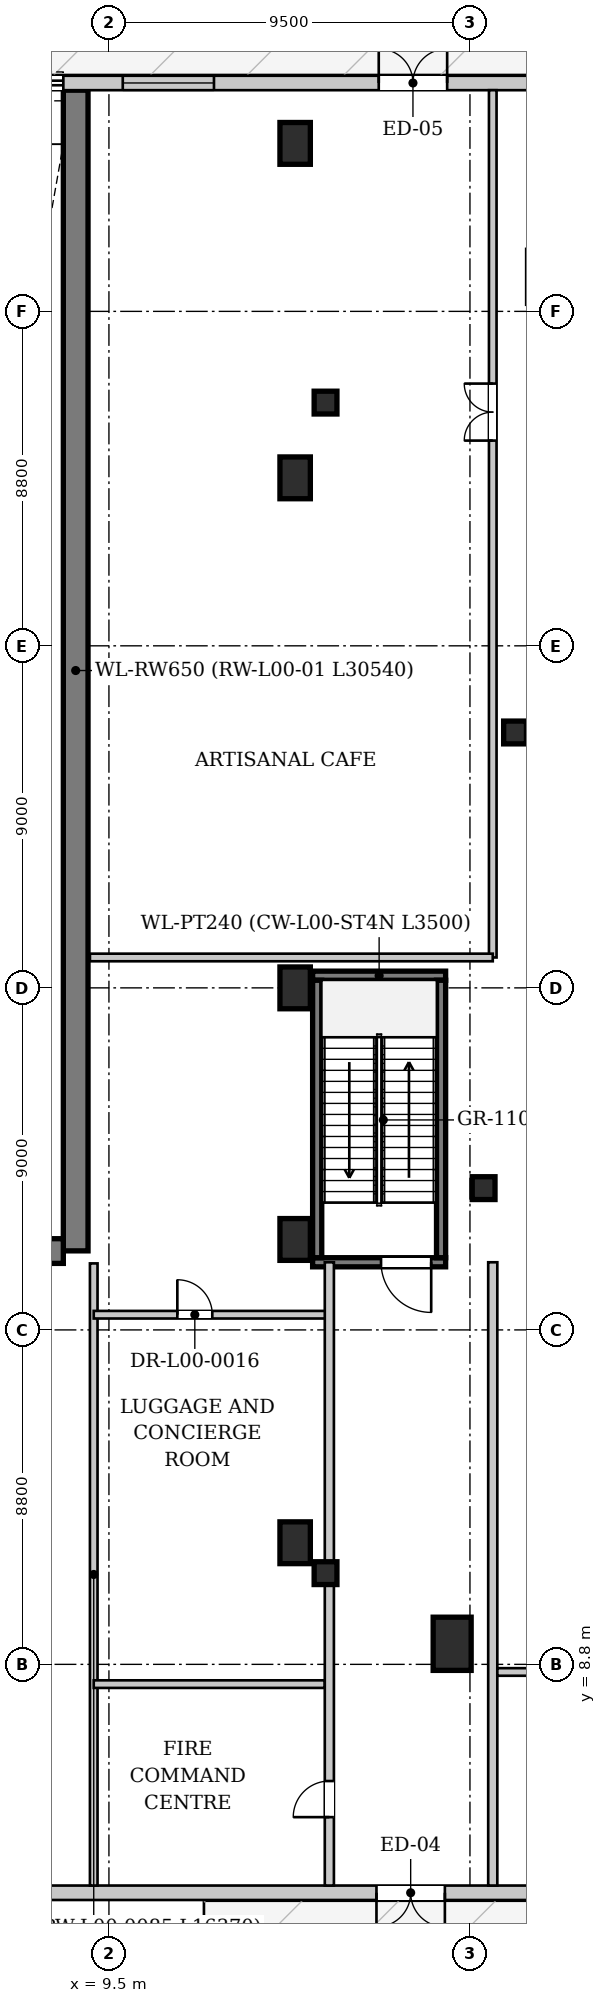
"""IFC4 building model, lengths in metres.
Left out: names, types, materials, properties, quantities, classifications, styles, units other than length and angle.
Written with IfcOpenShell. Run it as: python <this file> out.ifc"""

import sys

from ifc_helpers import new_model, si_unit, direction, frame, frame_2d, origin, origin_2d, place, context, subcontext, project, spatial, rectangle, hollow_rectangle, extrude, source, transform, mapped, element, fill, save


model = new_model("IFC4")
c1 = context("Model", 3, precision=1e-05, world=origin(), true_north=direction((0.0, 1.0)))
c2 = subcontext(c1, "Body", "Model", "MODEL_VIEW")
j1 = project(units=[si_unit("LENGTHUNIT", "METRE"), si_unit("PLANEANGLEUNIT", "RADIAN")], contexts=[c1])
p1 = place(None, origin())
s1 = spatial("IfcSite", under=j1, at=p1, CompositionType="ELEMENT")
p2 = place(p1, origin())
s2 = spatial("IfcBuilding", under=s1, at=p2, CompositionType="ELEMENT")
p3 = place(p2, origin())
s3 = spatial("IfcBuildingStorey", under=s2, at=p3, CompositionType="ELEMENT", Elevation=0.0)
p4 = place(p3, frame((8.625, 19.68, 0.0), z_axis=(0.0, 0.0, 1.0), x_axis=(0.0, 1.0, 0.0)))
e1 = element("IfcWall", 1, at=p4, inside=s3, PredefinedType="SOLIDWALL", context=c2, shape_type="SweptSolid", body=[
    extrude(rectangle(XDim=30.54, YDim=0.65, at=frame_2d((15.27, 0.0))), origin(), (0.0, 0.0, 1.0), 5.08),
])
p5 = place(p3, frame((2.38, 19.675, 0.0), z_axis=(0.0, 0.0, 1.0), x_axis=(1.0, 0.0, 0.0)))
e2 = element("IfcWall", 2, at=p5, inside=s3, PredefinedType="SOLIDWALL", context=c2, shape_type="SweptSolid", body=[
    extrude(rectangle(XDim=5.92, YDim=0.65, at=frame_2d((2.96, 0.0))), origin(), (0.0, 0.0, 1.0), 5.08),
])
m1 = source(origin(), c2, "Body", "SweptSolid", [
    extrude(rectangle(XDim=1.0, YDim=1.4, at=origin_2d()), origin(), (0.0, 0.0, 1.0), 5.235),
])
p6 = place(p3, frame((18.532, 9.341, 0.0), z_axis=(0.0, 0.0, 1.0), x_axis=(1.0, 0.0, 0.0)))
e3 = element("IfcColumn", 3, at=p6, inside=s3, PredefinedType="COLUMN", context=c2, shape_type="MappedRepresentation", body=[
    mapped(m1, transform((0.0, 0.0, 0.0), x_axis=(1.0, 0.0, 0.0), y_axis=(0.0, 1.0, 0.0), z_axis=(0.0, 0.0, 1.0), scale=1.0)),
])
m2 = source(origin(), c2, "Body", "SweptSolid", [
    extrude(hollow_rectangle(XDim=0.6, YDim=0.6, WallThickness=0.035, at=origin_2d()), origin(), (0.0, 0.0, 1.0), 5.235),
])
for number, where, z_axis, x_axis in (
    (4, (15.2, 11.2, 0.0), (0.0, 0.0, 1.0), (1.0, 0.0, 0.0)),
    (5, (15.2, 42.0, 0.0), (0.0, 0.0, 1.0), (1.0, 0.0, 0.0)),
):
    element("IfcColumn", number, at=place(p3, frame(where, z_axis=z_axis, x_axis=x_axis)), inside=s3, PredefinedType="COLUMN", context=c2, shape_type="MappedRepresentation", body=[
        mapped(m2, transform((0.0, 0.0, 0.0), x_axis=(1.0, 0.0, 0.0), y_axis=(0.0, 1.0, 0.0), z_axis=(0.0, 0.0, 1.0), scale=1.0)),
    ])
m3 = source(origin(), c2, "Body", "SweptSolid", [
    extrude(rectangle(XDim=0.8, YDim=1.1, at=origin_2d()), origin(), (0.0, 0.0, 1.0), 5.235),
])
for number, where, z_axis, x_axis in (
    (6, (14.4, 12.0, 0.0), (0.0, 0.0, 1.0), (1.0, 0.0, 0.0)),
    (7, (14.4, 19.98, 0.0), (0.0, 0.0, 1.0), (1.0, 0.0, 0.0)),
    (8, (14.4, 26.6, 0.0), (0.0, 0.0, 1.0), (1.0, 0.0, 0.0)),
    (9, (14.4, 40.02, 0.0), (0.0, 0.0, 1.0), (1.0, 0.0, 0.0)),
    (10, (14.4, 48.82, 0.0), (0.0, 0.0, 1.0), (1.0, 0.0, 0.0)),
):
    element("IfcColumn", number, at=place(p3, frame(where, z_axis=z_axis, x_axis=x_axis)), inside=s3, PredefinedType="COLUMN", context=c2, shape_type="MappedRepresentation", body=[
        mapped(m3, transform((0.0, 0.0, 0.0), x_axis=(1.0, 0.0, 0.0), y_axis=(0.0, 1.0, 0.0), z_axis=(0.0, 0.0, 1.0), scale=1.0)),
    ])
for number, where, z_axis, x_axis in (
    (11, (20.187, 33.32, 0.0), (0.0, 0.0, 1.0), (1.0, 0.0, 0.0)),
    (12, (19.359, 21.331, 0.0), (0.0, 0.0, 1.0), (1.0, 0.0, 0.0)),
):
    element("IfcColumn", number, at=place(p3, frame(where, z_axis=z_axis, x_axis=x_axis)), inside=s3, PredefinedType="COLUMN", context=c2, shape_type="MappedRepresentation", body=[
        mapped(m2, transform((0.0, 0.0, 0.0), x_axis=(1.0, 0.0, 0.0), y_axis=(0.0, 1.0, 0.0), z_axis=(0.0, 0.0, 1.0), scale=1.0)),
    ])
p7 = place(p3, frame((34.8, 2.79, 0.0), z_axis=(0.0, 0.0, 1.0), x_axis=(-1.0, 0.0, 0.0)))
e13 = element("IfcWall", 13, at=p7, inside=s3, PredefinedType="SOLIDWALL", context=c2, shape_type="SweptSolid", body=[
    extrude(rectangle(XDim=32.8, YDim=0.38, at=frame_2d((16.4, 0.0))), origin(), (0.0, 0.0, 1.0), 4.522),
])
p8 = place(p7, frame((7.3, 0.0, 0.0)))
e14 = element("IfcOpeningElement", 14, at=p8, cuts=e13, PredefinedType="OPENING", context=c2, shape_type="SweptSolid", body=[
    extrude(rectangle(XDim=1.8, YDim=2.4, at=frame_2d((0.9, 1.2))), frame((0.0, 0.2, 0.0), z_axis=(0.0, -1.0, 0.0), x_axis=(1.0, 0.0, 0.0)), (0.0, 0.0, 1.0), 0.4),
])
p9 = place(p7, frame((16.46, 0.0, 0.0)))
e15 = element("IfcOpeningElement", 15, at=p9, cuts=e13, PredefinedType="OPENING", context=c2, shape_type="SweptSolid", body=[
    extrude(rectangle(XDim=1.8, YDim=2.4, at=frame_2d((0.9, 1.2))), frame((0.0, 0.2, 0.0), z_axis=(0.0, -1.0, 0.0), x_axis=(1.0, 0.0, 0.0)), (0.0, 0.0, 1.0), 0.4),
])
p10 = place(p7, frame((3.016, 0.0, 0.85)))
e16 = element("IfcOpeningElement", 16, at=p10, cuts=e13, PredefinedType="OPENING", context=c2, shape_type="SweptSolid", body=[
    extrude(rectangle(XDim=2.4, YDim=3.0, at=frame_2d((1.2, 1.5))), frame((0.0, 0.2, 0.0), z_axis=(0.0, -1.0, 0.0), x_axis=(1.0, 0.0, 0.0)), (0.0, 0.0, 1.0), 0.4),
])
p11 = place(p3, frame((2.0, 50.41, 0.0), z_axis=(0.0, 0.0, 1.0), x_axis=(1.0, 0.0, 0.0)))
e17 = element("IfcWall", 17, at=p11, inside=s3, PredefinedType="SOLIDWALL", context=c2, shape_type="SweptSolid", body=[
    extrude(rectangle(XDim=36.2, YDim=0.38, at=frame_2d((18.1, 0.0))), origin(), (0.0, 0.0, 1.0), 4.522),
])
p12 = place(p11, frame((1.2, 0.0, 0.0)))
e18 = element("IfcOpeningElement", 18, at=p12, cuts=e17, PredefinedType="OPENING", context=c2, shape_type="SweptSolid", body=[
    extrude(rectangle(XDim=5.1, YDim=4.2, at=frame_2d((2.55, 2.1))), frame((0.0, 0.2, 0.0), z_axis=(0.0, -1.0, 0.0), x_axis=(1.0, 0.0, 0.0)), (0.0, 0.0, 1.0), 0.4),
])
p13 = place(p11, frame((14.6, 0.0, 0.0)))
e19 = element("IfcOpeningElement", 19, at=p13, cuts=e17, PredefinedType="OPENING", context=c2, shape_type="SweptSolid", body=[
    extrude(rectangle(XDim=1.8, YDim=2.4, at=frame_2d((0.9, 1.2))), frame((0.0, 0.2, 0.0), z_axis=(0.0, -1.0, 0.0), x_axis=(1.0, 0.0, 0.0)), (0.0, 0.0, 1.0), 0.4),
])
p14 = place(p11, frame((32.35, 0.0, 0.0)))
e20 = element("IfcOpeningElement", 20, at=p14, cuts=e17, PredefinedType="OPENING", context=c2, shape_type="SweptSolid", body=[
    extrude(rectangle(XDim=1.8, YDim=2.4, at=frame_2d((0.9, 1.2))), frame((0.0, 0.2, 0.0), z_axis=(0.0, -1.0, 0.0), x_axis=(1.0, 0.0, 0.0)), (0.0, 0.0, 1.0), 0.4),
])
p15 = place(p11, frame((7.864, 0.0, 0.85)))
e21 = element("IfcOpeningElement", 21, at=p15, cuts=e17, PredefinedType="OPENING", context=c2, shape_type="SweptSolid", body=[
    extrude(rectangle(XDim=2.4, YDim=3.0, at=frame_2d((1.2, 1.5))), frame((0.0, 0.2, 0.0), z_axis=(0.0, -1.0, 0.0), x_axis=(1.0, 0.0, 0.0)), (0.0, 0.0, 1.0), 0.4),
])
p16 = place(p3, frame((18.36, 19.38, 0.0), z_axis=(0.0, 0.0, 1.0), x_axis=(-1.0, 0.0, 0.0)))
e22 = element("IfcWall", 22, at=p16, inside=s3, PredefinedType="PARTITIONING", context=c2, shape_type="SweptSolid", body=[
    extrude(rectangle(XDim=3.5, YDim=0.24, at=frame_2d((1.75, 0.0))), origin(), (0.0, 0.0, 1.0), 5.08),
])
p17 = place(p16, frame((0.38, 0.0, 0.0)))
e23 = element("IfcOpeningElement", 23, at=p17, cuts=e22, PredefinedType="OPENING", context=c2, shape_type="SweptSolid", body=[
    extrude(rectangle(XDim=1.32, YDim=2.2, at=frame_2d((0.66, 1.1))), frame((0.0, 0.13, 0.0), z_axis=(0.0, -1.0, 0.0), x_axis=(1.0, 0.0, 0.0)), (0.0, 0.0, 1.0), 0.26),
])
p18 = place(p3, frame((14.86, 26.92, 0.0), z_axis=(0.0, 0.0, 1.0), x_axis=(1.0, 0.0, 0.0)))
e24 = element("IfcWall", 24, at=p18, inside=s3, PredefinedType="PARTITIONING", context=c2, shape_type="SweptSolid", body=[
    extrude(rectangle(XDim=3.5, YDim=0.24, at=frame_2d((1.75, 0.0))), origin(), (0.0, 0.0, 1.0), 5.08),
])
for number, where, z_axis, x_axis in (
    (25, (14.98, 19.5, 0.0), (0.0, 0.0, 1.0), (0.0, 1.0, 0.0)),
    (26, (18.24, 26.8, 0.0), (0.0, 0.0, 1.0), (0.0, -1.0, 0.0)),
):
    element("IfcWall", number, at=place(p3, frame(where, z_axis=z_axis, x_axis=x_axis)), inside=s3, PredefinedType="PARTITIONING", context=c2, shape_type="SweptSolid", body=[
        extrude(rectangle(XDim=7.3, YDim=0.24, at=frame_2d((3.65, 0.0))), origin(), (0.0, 0.0, 1.0), 5.08),
    ])
p19 = place(p3, frame((9.1, 2.98, 0.0), z_axis=(0.0, 0.0, 1.0), x_axis=(0.0, 1.0, 0.0)))
e27 = element("IfcWall", 27, at=p19, inside=s3, PredefinedType="PARTITIONING", context=c2, shape_type="SweptSolid", body=[
    extrude(rectangle(XDim=16.37, YDim=0.2, at=frame_2d((8.185, 0.0))), origin(), (0.0, 0.0, 1.0), 4.43),
])
p20 = place(p3, frame((9.1, 8.28, 0.0), z_axis=(0.0, 0.0, 1.0), x_axis=(1.0, 0.0, 0.0)))
e28 = element("IfcWall", 28, at=p20, inside=s3, PredefinedType="PARTITIONING", context=c2, shape_type="SweptSolid", body=[
    extrude(rectangle(XDim=6.08, YDim=0.2, at=frame_2d((3.04, 0.0))), origin(), (0.0, 0.0, 1.0), 4.43),
])
p21 = place(p3, frame((9.1, 18.0, 0.0), z_axis=(0.0, 0.0, 1.0), x_axis=(1.0, 0.0, 0.0)))
e29 = element("IfcWall", 29, at=p21, inside=s3, PredefinedType="PARTITIONING", context=c2, shape_type="SweptSolid", body=[
    extrude(rectangle(XDim=6.2, YDim=0.2, at=frame_2d((3.1, 0.0))), origin(), (0.0, 0.0, 1.0), 4.43),
])
p22 = place(p21, frame((2.2, 0.0, 0.0)))
e30 = element("IfcOpeningElement", 30, at=p22, cuts=e29, PredefinedType="OPENING", context=c2, shape_type="SweptSolid", body=[
    extrude(rectangle(XDim=0.92, YDim=2.1, at=frame_2d((0.46, 1.05))), frame((0.0, 0.11, 0.0), z_axis=(0.0, -1.0, 0.0), x_axis=(1.0, 0.0, 0.0)), (0.0, 0.0, 1.0), 0.22),
])
p23 = place(p3, frame((15.3, 2.98, 0.0), z_axis=(0.0, 0.0, 1.0), x_axis=(0.0, 1.0, 0.0)))
e31 = element("IfcWall", 31, at=p23, inside=s3, PredefinedType="PARTITIONING", context=c2, shape_type="SweptSolid", body=[
    extrude(rectangle(XDim=16.4, YDim=0.24, at=frame_2d((8.2, 0.0))), origin(), (0.0, 0.0, 1.0), 4.43),
])
p24 = place(p23, frame((1.8, 0.0, 0.0)))
e32 = element("IfcOpeningElement", 32, at=p24, cuts=e31, PredefinedType="OPENING", context=c2, shape_type="SweptSolid", body=[
    extrude(rectangle(XDim=0.95, YDim=2.1, at=frame_2d((0.475, 1.05))), frame((0.0, 0.13, 0.0), z_axis=(0.0, -1.0, 0.0), x_axis=(1.0, 0.0, 0.0)), (0.0, 0.0, 1.0), 0.26),
])
p25 = place(p3, frame((19.6, 2.98, 0.0), z_axis=(0.0, 0.0, 1.0), x_axis=(0.0, 1.0, 0.0)))
e33 = element("IfcWall", 33, at=p25, inside=s3, PredefinedType="PARTITIONING", context=c2, shape_type="SweptSolid", body=[
    extrude(rectangle(XDim=16.4, YDim=0.24, at=frame_2d((8.2, 0.0))), origin(), (0.0, 0.0, 1.0), 4.43),
])
p26 = place(p3, frame((19.6, 27.4, 0.0), z_axis=(0.0, 0.0, 1.0), x_axis=(0.0, 1.0, 0.0)))
e34 = element("IfcWall", 34, at=p26, inside=s3, PredefinedType="PARTITIONING", context=c2, shape_type="SweptSolid", body=[
    extrude(rectangle(XDim=22.82, YDim=0.2, at=frame_2d((11.41, 0.0))), origin(), (0.0, 0.0, 1.0), 4.43),
])
p27 = place(p26, frame((13.6, 0.0, 0.0)))
e35 = element("IfcOpeningElement", 35, at=p27, cuts=e34, PredefinedType="OPENING", context=c2, shape_type="SweptSolid", body=[
    extrude(rectangle(XDim=1.5, YDim=2.25, at=frame_2d((0.75, 1.125))), frame((0.0, 0.11, 0.0), z_axis=(0.0, -1.0, 0.0), x_axis=(1.0, 0.0, 0.0)), (0.0, 0.0, 1.0), 0.22),
])
p28 = place(p3, frame((9.0, 27.4, 0.0), z_axis=(0.0, 0.0, 1.0), x_axis=(1.0, 0.0, 0.0)))
e36 = element("IfcWall", 36, at=p28, inside=s3, PredefinedType="PARTITIONING", context=c2, shape_type="SweptSolid", body=[
    extrude(rectangle(XDim=10.6, YDim=0.2, at=frame_2d((5.3, 0.0))), origin(), (0.0, 0.0, 1.0), 4.43),
])
p29 = place(p3, frame((19.72, 8.6, 0.0), z_axis=(0.0, 0.0, 1.0), x_axis=(1.0, 0.0, 0.0)))
e37 = element("IfcWall", 37, at=p29, inside=s3, PredefinedType="PARTITIONING", context=c2, shape_type="SweptSolid", body=[
    extrude(rectangle(XDim=34.76, YDim=0.2, at=frame_2d((17.38, 0.0))), origin(), (0.0, 0.0, 1.0), 4.43),
])
m4 = source(origin(), c2, "Body", "SweptSolid", [
    extrude(rectangle(XDim=5.1, YDim=4.2, at=frame_2d((2.55, 2.1))), frame((0.0, 0.025, 0.0), z_axis=(0.0, -1.0, 0.0), x_axis=(1.0, 0.0, 0.0)), (0.0, 0.0, 1.0), 0.05),
])
p30 = place(p12, origin())
e38 = element("IfcDoor", 38, at=p30, inside=s3, OperationType="ROLLINGUP", PredefinedType="GATE", context=c2, shape_type="MappedRepresentation", body=[
    mapped(m4, transform((0.0, 0.0, 0.0), x_axis=(1.0, 0.0, 0.0), y_axis=(0.0, 1.0, 0.0), z_axis=(0.0, 0.0, 1.0), scale=1.0)),
])
fill(e18, e38)
m5 = source(origin(), c2, "Body", "SweptSolid", [
    extrude(rectangle(XDim=1.8, YDim=2.4, at=frame_2d((0.9, 1.2))), frame((0.0, 0.025, 0.0), z_axis=(0.0, -1.0, 0.0), x_axis=(1.0, 0.0, 0.0)), (0.0, 0.0, 1.0), 0.05),
])
p31 = place(p9, origin())
e39 = element("IfcDoor", 39, at=p31, inside=s3, OperationType="DOUBLE_DOOR_SINGLE_SWING", PredefinedType="DOOR", context=c2, shape_type="MappedRepresentation", body=[
    mapped(m5, transform((0.0, 0.0, 0.0), x_axis=(1.0, 0.0, 0.0), y_axis=(0.0, 1.0, 0.0), z_axis=(0.0, 0.0, 1.0), scale=1.0)),
])
fill(e15, e39)
p32 = place(p13, origin())
e40 = element("IfcDoor", 40, at=p32, inside=s3, OperationType="DOUBLE_DOOR_SINGLE_SWING", PredefinedType="DOOR", context=c2, shape_type="MappedRepresentation", body=[
    mapped(m5, transform((0.0, 0.0, 0.0), x_axis=(1.0, 0.0, 0.0), y_axis=(0.0, 1.0, 0.0), z_axis=(0.0, 0.0, 1.0), scale=1.0)),
])
fill(e19, e40)
m6 = source(origin(), c2, "Body", "SweptSolid", [
    extrude(rectangle(XDim=2.4, YDim=3.0, at=frame_2d((1.2, 1.5))), frame((0.0, 0.03, 0.0), z_axis=(0.0, -1.0, 0.0), x_axis=(1.0, 0.0, 0.0)), (0.0, 0.0, 1.0), 0.06),
])
p33 = place(p15, origin())
e41 = element("IfcWindow", 41, at=p33, inside=s3, PartitioningType="SINGLE_PANEL", PredefinedType="WINDOW", context=c2, shape_type="MappedRepresentation", body=[
    mapped(m6, transform((0.0, 0.0, 0.0), x_axis=(1.0, 0.0, 0.0), y_axis=(0.0, 1.0, 0.0), z_axis=(0.0, 0.0, 1.0), scale=1.0)),
])
fill(e21, e41)
m7 = source(origin(), c2, "Body", "SweptSolid", [
    extrude(rectangle(XDim=1.32, YDim=2.2, at=frame_2d((0.66, 1.1))), frame((0.0, 0.025, 0.0), z_axis=(0.0, -1.0, 0.0), x_axis=(1.0, 0.0, 0.0)), (0.0, 0.0, 1.0), 0.05),
])
p34 = place(p17, origin())
e42 = element("IfcDoor", 42, at=p34, inside=s3, OperationType="SINGLE_SWING_LEFT", PredefinedType="DOOR", context=c2, shape_type="MappedRepresentation", body=[
    mapped(m7, transform((0.0, 0.0, 0.0), x_axis=(1.0, 0.0, 0.0), y_axis=(0.0, 1.0, 0.0), z_axis=(0.0, 0.0, 1.0), scale=1.0)),
])
fill(e23, e42)
m8 = source(origin(), c2, "Body", "SweptSolid", [
    extrude(rectangle(XDim=0.92, YDim=2.1, at=frame_2d((0.46, 1.05))), frame((0.0, 0.025, 0.0), z_axis=(0.0, -1.0, 0.0), x_axis=(1.0, 0.0, 0.0)), (0.0, 0.0, 1.0), 0.05),
])
p35 = place(p22, origin())
e43 = element("IfcDoor", 43, at=p35, inside=s3, OperationType="SINGLE_SWING_LEFT", PredefinedType="DOOR", context=c2, shape_type="MappedRepresentation", body=[
    mapped(m8, transform((0.0, 0.0, 0.0), x_axis=(1.0, 0.0, 0.0), y_axis=(0.0, 1.0, 0.0), z_axis=(0.0, 0.0, 1.0), scale=1.0)),
])
fill(e30, e43)
m9 = source(origin(), c2, "Body", "SweptSolid", [
    extrude(rectangle(XDim=0.95, YDim=2.1, at=frame_2d((0.475, 1.05))), frame((0.0, 0.025, 0.0), z_axis=(0.0, -1.0, 0.0), x_axis=(1.0, 0.0, 0.0)), (0.0, 0.0, 1.0), 0.05),
])
p36 = place(p24, origin())
e44 = element("IfcDoor", 44, at=p36, inside=s3, OperationType="SINGLE_SWING_LEFT", PredefinedType="DOOR", context=c2, shape_type="MappedRepresentation", body=[
    mapped(m9, transform((0.0, 0.0, 0.0), x_axis=(1.0, 0.0, 0.0), y_axis=(0.0, 1.0, 0.0), z_axis=(0.0, 0.0, 1.0), scale=1.0)),
])
fill(e32, e44)
m10 = source(origin(), c2, "Body", "SweptSolid", [
    extrude(rectangle(XDim=1.5, YDim=2.25, at=frame_2d((0.75, 1.125))), frame((0.0, 0.025, 0.0), z_axis=(0.0, -1.0, 0.0), x_axis=(1.0, 0.0, 0.0)), (0.0, 0.0, 1.0), 0.05),
])
p37 = place(p27, origin())
e45 = element("IfcDoor", 45, at=p37, inside=s3, OperationType="DOUBLE_DOOR_SINGLE_SWING", PredefinedType="DOOR", context=c2, shape_type="MappedRepresentation", body=[
    mapped(m10, transform((0.0, 0.0, 0.0), x_axis=(1.0, 0.0, 0.0), y_axis=(0.0, 1.0, 0.0), z_axis=(0.0, 0.0, 1.0), scale=1.0)),
])
fill(e35, e45)
save(model, sys.argv[1])
